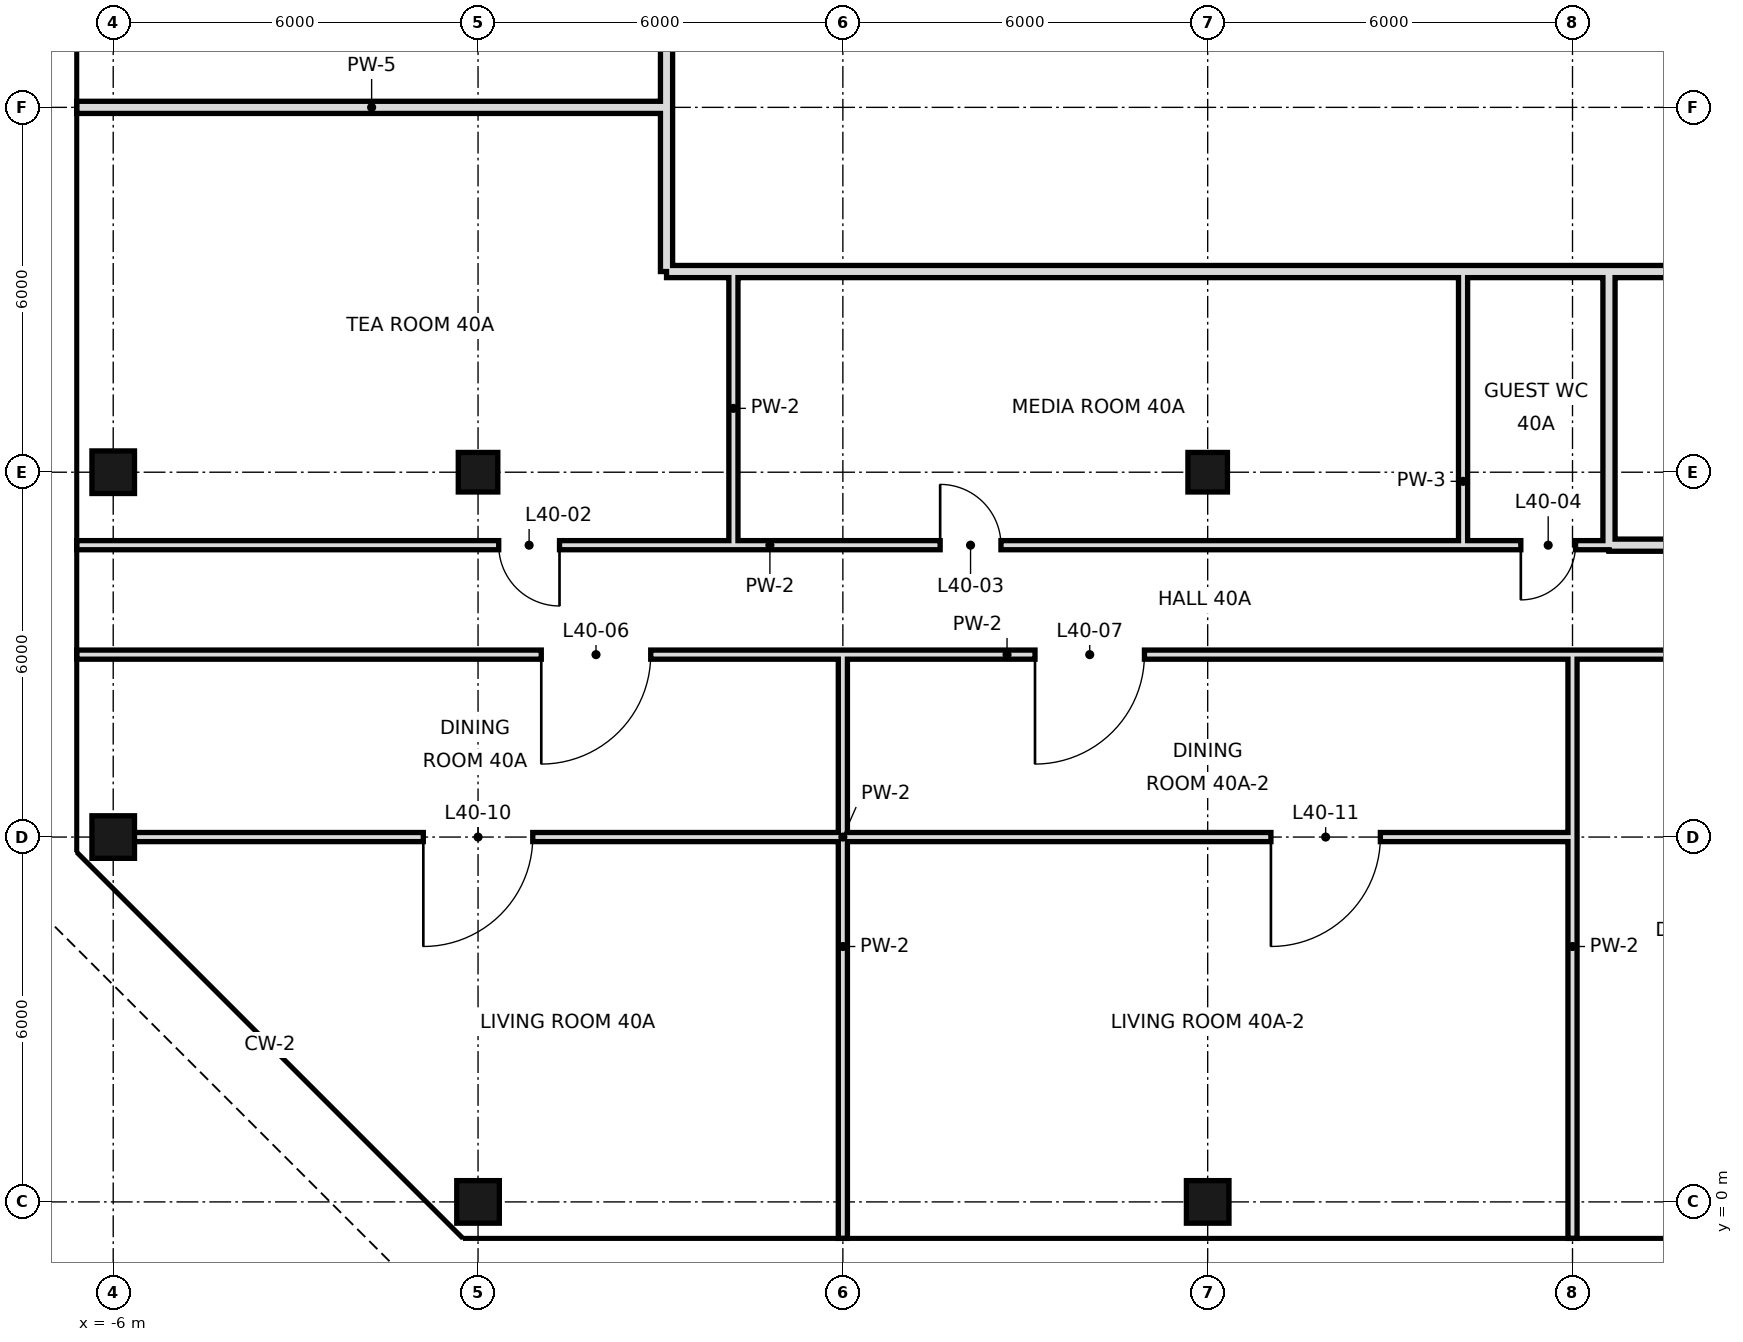
"""IFC4 building model, lengths in metres.
Left out: names, types, materials, properties, quantities, classifications, styles, units other than length and angle.
Written with IfcOpenShell. Run it as: python <this file> out.ifc"""

import sys

from ifc_helpers import new_model, si_unit, direction, frame, frame_2d, origin, origin_2d, place, context, subcontext, project, spatial, rectangle, hollow_rectangle, extrude, element, fill, save


model = new_model("IFC4")
c1 = context("Model", 3, precision=1e-05, world=origin(), true_north=direction((0.0, 1.0)))
c2 = subcontext(c1, "Body", "Model", "MODEL_VIEW")
j1 = project(units=[si_unit("LENGTHUNIT", "METRE"), si_unit("PLANEANGLEUNIT", "RADIAN")], contexts=[c1])
p1 = place(None, origin())
s1 = spatial("IfcSite", under=j1, at=p1, CompositionType="ELEMENT")
p2 = place(p1, origin())
s2 = spatial("IfcBuilding", under=s1, at=p2, CompositionType="ELEMENT")
p3 = place(p2, frame((0.0, 0.0, 174.4)))
s3 = spatial("IfcBuildingStorey", under=s2, at=p3, CompositionType="ELEMENT", Elevation=174.4)
for number, where, z_axis, x_axis in (
    (1, (-6.0, 6.0, 0.0), (0.0, 0.0, 1.0), (1.0, 0.0, 0.0)),
    (2, (-6.0, 12.0, 0.0), (0.0, 0.0, 1.0), (1.0, 0.0, 0.0)),
    (3, (0.0, 0.0, 0.0), (0.0, 0.0, 1.0), (1.0, 0.0, 0.0)),
):
    element("IfcColumn", number, at=place(p3, frame(where, z_axis=z_axis, x_axis=x_axis)), inside=s3, PredefinedType="COLUMN", context=c2, shape_type="SweptSolid", body=[
        extrude(hollow_rectangle(XDim=0.7, YDim=0.7, WallThickness=0.036, at=origin_2d()), origin(), (0.0, 0.0, 1.0), 3.6),
    ])
p4 = place(p3, frame((0.0, 12.0, 0.0), z_axis=(0.0, 0.0, 1.0), x_axis=(1.0, 0.0, 0.0)))
e4 = element("IfcColumn", 4, at=p4, inside=s3, PredefinedType="COLUMN", context=c2, shape_type="SweptSolid", body=[
    extrude(hollow_rectangle(XDim=0.65, YDim=0.65, WallThickness=0.032, at=origin_2d()), origin(), (0.0, 0.0, 1.0), 3.6),
])
p5 = place(p3, frame((12.0, 0.0, 0.0), z_axis=(0.0, 0.0, 1.0), x_axis=(1.0, 0.0, 0.0)))
e5 = element("IfcColumn", 5, at=p5, inside=s3, PredefinedType="COLUMN", context=c2, shape_type="SweptSolid", body=[
    extrude(hollow_rectangle(XDim=0.7, YDim=0.7, WallThickness=0.036, at=origin_2d()), origin(), (0.0, 0.0, 1.0), 3.6),
])
p6 = place(p3, frame((12.0, 12.0, 0.0), z_axis=(0.0, 0.0, 1.0), x_axis=(1.0, 0.0, 0.0)))
e6 = element("IfcColumn", 6, at=p6, inside=s3, PredefinedType="COLUMN", context=c2, shape_type="SweptSolid", body=[
    extrude(hollow_rectangle(XDim=0.65, YDim=0.65, WallThickness=0.032, at=origin_2d()), origin(), (0.0, 0.0, 1.0), 3.6),
])
p7 = place(p3, frame((16.2, 10.8, 0.0), z_axis=(0.0, 0.0, 1.0), x_axis=(0.0, 1.0, 0.0)))
e7 = element("IfcWall", 7, at=p7, inside=s3, PredefinedType="PARTITIONING", context=c2, shape_type="SweptSolid", body=[
    extrude(rectangle(XDim=4.5, YDim=0.15, at=frame_2d((2.25, 0.0))), origin(), (0.0, 0.0, 1.0), 3.42),
])
p8 = place(p3, frame((18.0, -0.6, 0.0), z_axis=(0.0, 0.0, 1.0), x_axis=(0.0, 1.0, 0.0)))
e8 = element("IfcWall", 8, at=p8, inside=s3, PredefinedType="PARTITIONING", context=c2, shape_type="SweptSolid", body=[
    extrude(rectangle(XDim=9.6, YDim=0.15, at=frame_2d((4.8, 0.0))), origin(), (0.0, 0.0, 1.0), 2.72),
])
p9 = place(p3, frame((18.6, 10.8, 0.0), z_axis=(0.0, 0.0, 1.0), x_axis=(0.0, 1.0, 0.0)))
e9 = element("IfcWall", 9, at=p9, inside=s3, PredefinedType="SOLIDWALL", context=c2, shape_type="SweptSolid", body=[
    extrude(rectangle(XDim=4.5, YDim=0.2, at=frame_2d((2.25, 0.0))), origin(), (0.0, 0.0, 1.0), 2.72),
])
p10 = place(p3, frame((3.1, 15.3, 0.0), z_axis=(0.0, 0.0, 1.0), x_axis=(0.0, 1.0, 0.0)))
e10 = element("IfcWall", 10, at=p10, inside=s3, PredefinedType="SOLIDWALL", context=c2, shape_type="SweptSolid", body=[
    extrude(rectangle(XDim=33.3, YDim=0.2, at=frame_2d((16.65, 0.0))), origin(), (0.0, 0.0, 1.0), 2.72),
])
p11 = place(p10, frame((17.1, 0.0, 0.0)))
e11 = element("IfcOpeningElement", 11, at=p11, cuts=e10, PredefinedType="OPENING", context=c2, shape_type="SweptSolid", body=[
    extrude(rectangle(XDim=1.2, YDim=2.4, at=frame_2d((0.6, 1.2))), frame((0.0, 0.11, 0.0), z_axis=(0.0, -1.0, 0.0), x_axis=(1.0, 0.0, 0.0)), (0.0, 0.0, 1.0), 0.22),
])
p12 = place(p3, frame((4.2, 10.8, 0.0), z_axis=(0.0, 0.0, 1.0), x_axis=(0.0, 1.0, 0.0)))
e12 = element("IfcWall", 12, at=p12, inside=s3, PredefinedType="PARTITIONING", context=c2, shape_type="SweptSolid", body=[
    extrude(rectangle(XDim=4.5, YDim=0.15, at=frame_2d((2.25, 0.0))), origin(), (0.0, 0.0, 1.0), 3.42),
])
p13 = place(p3, frame((6.0, -0.6, 0.0), z_axis=(0.0, 0.0, 1.0), x_axis=(0.0, 1.0, 0.0)))
e13 = element("IfcWall", 13, at=p13, inside=s3, PredefinedType="PARTITIONING", context=c2, shape_type="SweptSolid", body=[
    extrude(rectangle(XDim=9.6, YDim=0.15, at=frame_2d((4.8, 0.0))), origin(), (0.0, 0.0, 1.0), 2.72),
])
p14 = place(p3, frame((18.6, 10.8, 0.0), z_axis=(0.0, 0.0, 1.0), x_axis=(1.0, 0.0, 0.0)))
e14 = element("IfcWall", 14, at=p14, inside=s3, PredefinedType="SOLIDWALL", context=c2, shape_type="SweptSolid", body=[
    extrude(rectangle(XDim=5.4, YDim=0.2, at=frame_2d((2.7, 0.0))), origin(), (0.0, 0.0, 1.0), 2.72),
])
p15 = place(p14, frame((2.98, 0.0, 0.0)))
e15 = element("IfcOpeningElement", 15, at=p15, cuts=e14, PredefinedType="OPENING", context=c2, shape_type="SweptSolid", body=[
    extrude(rectangle(XDim=1.0, YDim=2.4, at=frame_2d((0.5, 1.2))), frame((0.0, 0.11, 0.0), z_axis=(0.0, -1.0, 0.0), x_axis=(1.0, 0.0, 0.0)), (0.0, 0.0, 1.0), 0.22),
])
p16 = place(p3, frame((-6.6, 10.8, 0.0), z_axis=(0.0, 0.0, 1.0), x_axis=(1.0, 0.0, 0.0)))
e16 = element("IfcWall", 16, at=p16, inside=s3, PredefinedType="PARTITIONING", context=c2, shape_type="SweptSolid", body=[
    extrude(rectangle(XDim=22.8, YDim=0.15, at=frame_2d((11.4, 0.0))), origin(), (0.0, 0.0, 1.0), 3.42),
])
p17 = place(p16, frame((6.94, 0.0, 0.0)))
e17 = element("IfcOpeningElement", 17, at=p17, cuts=e16, PredefinedType="OPENING", context=c2, shape_type="SweptSolid", body=[
    extrude(rectangle(XDim=1.0, YDim=2.4, at=frame_2d((0.5, 1.2))), frame((0.0, 0.085, 0.0), z_axis=(0.0, -1.0, 0.0), x_axis=(1.0, 0.0, 0.0)), (0.0, 0.0, 1.0), 0.17),
])
p18 = place(p16, frame((14.2, 0.0, 0.0)))
e18 = element("IfcOpeningElement", 18, at=p18, cuts=e16, PredefinedType="OPENING", context=c2, shape_type="SweptSolid", body=[
    extrude(rectangle(XDim=1.0, YDim=2.4, at=frame_2d((0.5, 1.2))), frame((0.0, 0.085, 0.0), z_axis=(0.0, -1.0, 0.0), x_axis=(1.0, 0.0, 0.0)), (0.0, 0.0, 1.0), 0.17),
])
p19 = place(p3, frame((16.2, 10.8, 0.0), z_axis=(0.0, 0.0, 1.0), x_axis=(1.0, 0.0, 0.0)))
e19 = element("IfcWall", 19, at=p19, inside=s3, PredefinedType="PARTITIONING", context=c2, shape_type="SweptSolid", body=[
    extrude(rectangle(XDim=2.4, YDim=0.15, at=frame_2d((1.2, 0.0))), origin(), (0.0, 0.0, 1.0), 3.42),
])
p20 = place(p19, frame((0.95, 0.0, 0.0)))
e20 = element("IfcOpeningElement", 20, at=p20, cuts=e19, PredefinedType="OPENING", context=c2, shape_type="SweptSolid", body=[
    extrude(rectangle(XDim=0.9, YDim=2.4, at=frame_2d((0.45, 1.2))), frame((0.0, 0.085, 0.0), z_axis=(0.0, -1.0, 0.0), x_axis=(1.0, 0.0, 0.0)), (0.0, 0.0, 1.0), 0.17),
])
p21 = place(p3, frame((3.1, 15.3, 0.0), z_axis=(0.0, 0.0, 1.0), x_axis=(1.0, 0.0, 0.0)))
e21 = element("IfcWall", 21, at=p21, inside=s3, PredefinedType="SOLIDWALL", context=c2, shape_type="SweptSolid", body=[
    extrude(rectangle(XDim=15.5, YDim=0.2, at=frame_2d((7.75, 0.0))), origin(), (0.0, 0.0, 1.0), 2.72),
])
p22 = place(p3, frame((18.6, 15.3, 0.0), z_axis=(0.0, 0.0, 1.0), x_axis=(1.0, 0.0, 0.0)))
e22 = element("IfcWall", 22, at=p22, inside=s3, PredefinedType="SOLIDWALL", context=c2, shape_type="SweptSolid", body=[
    extrude(rectangle(XDim=5.4, YDim=0.2, at=frame_2d((2.7, 0.0))), origin(), (0.0, 0.0, 1.0), 3.42),
])
p23 = place(p3, frame((-6.6, 18.0, 0.0), z_axis=(0.0, 0.0, 1.0), x_axis=(1.0, 0.0, 0.0)))
e23 = element("IfcWall", 23, at=p23, inside=s3, PredefinedType="SOLIDWALL", context=c2, shape_type="SweptSolid", body=[
    extrude(rectangle(XDim=9.7, YDim=0.2, at=frame_2d((4.85, 0.0))), origin(), (0.0, 0.0, 1.0), 2.72),
])
p24 = place(p3, frame((-6.0, 6.0, 0.0), z_axis=(0.0, 0.0, 1.0), x_axis=(1.0, 0.0, 0.0)))
e24 = element("IfcWall", 24, at=p24, inside=s3, PredefinedType="PARTITIONING", context=c2, shape_type="SweptSolid", body=[
    extrude(rectangle(XDim=24.0, YDim=0.15, at=frame_2d((12.0, 0.0))), origin(), (0.0, 0.0, 1.0), 2.97),
])
p25 = place(p24, frame((5.1, 0.0, 0.0)))
e25 = element("IfcOpeningElement", 25, at=p25, cuts=e24, PredefinedType="OPENING", context=c2, shape_type="SweptSolid", body=[
    extrude(rectangle(XDim=1.8, YDim=2.4, at=frame_2d((0.9, 1.2))), frame((0.0, 0.085, 0.0), z_axis=(0.0, -1.0, 0.0), x_axis=(1.0, 0.0, 0.0)), (0.0, 0.0, 1.0), 0.17),
])
p26 = place(p24, frame((19.04, 0.0, 0.0)))
e26 = element("IfcOpeningElement", 26, at=p26, cuts=e24, PredefinedType="OPENING", context=c2, shape_type="SweptSolid", body=[
    extrude(rectangle(XDim=1.8, YDim=2.4, at=frame_2d((0.9, 1.2))), frame((0.0, 0.085, 0.0), z_axis=(0.0, -1.0, 0.0), x_axis=(1.0, 0.0, 0.0)), (0.0, 0.0, 1.0), 0.17),
])
p27 = place(p3, frame((-6.6, 9.0, 0.0), z_axis=(0.0, 0.0, 1.0), x_axis=(1.0, 0.0, 0.0)))
e27 = element("IfcWall", 27, at=p27, inside=s3, PredefinedType="PARTITIONING", context=c2, shape_type="SweptSolid", body=[
    extrude(rectangle(XDim=30.6, YDim=0.15, at=frame_2d((15.3, 0.0))), origin(), (0.0, 0.0, 1.0), 3.42),
])
p28 = place(p27, frame((7.64, 0.0, 0.0)))
e28 = element("IfcOpeningElement", 28, at=p28, cuts=e27, PredefinedType="OPENING", context=c2, shape_type="SweptSolid", body=[
    extrude(rectangle(XDim=1.8, YDim=2.4, at=frame_2d((0.9, 1.2))), frame((0.0, 0.085, 0.0), z_axis=(0.0, -1.0, 0.0), x_axis=(1.0, 0.0, 0.0)), (0.0, 0.0, 1.0), 0.17),
])
p29 = place(p27, frame((15.76, 0.0, 0.0)))
e29 = element("IfcOpeningElement", 29, at=p29, cuts=e27, PredefinedType="OPENING", context=c2, shape_type="SweptSolid", body=[
    extrude(rectangle(XDim=1.8, YDim=2.4, at=frame_2d((0.9, 1.2))), frame((0.0, 0.085, 0.0), z_axis=(0.0, -1.0, 0.0), x_axis=(1.0, 0.0, 0.0)), (0.0, 0.0, 1.0), 0.17),
])
p30 = place(p27, frame((27.44, 0.0, 0.0)))
e30 = element("IfcOpeningElement", 30, at=p30, cuts=e27, PredefinedType="OPENING", context=c2, shape_type="SweptSolid", body=[
    extrude(rectangle(XDim=1.8, YDim=2.4, at=frame_2d((0.9, 1.2))), frame((0.0, 0.085, 0.0), z_axis=(0.0, -1.0, 0.0), x_axis=(1.0, 0.0, 0.0)), (0.0, 0.0, 1.0), 0.17),
])
p31 = place(p17, origin())
e31 = element("IfcDoor", 31, at=p31, inside=s3, OperationType="SINGLE_SWING_RIGHT", PredefinedType="DOOR", context=c2, shape_type="SweptSolid", body=[
    extrude(rectangle(XDim=1.0, YDim=2.4, at=frame_2d((0.5, 1.2))), frame((0.0, 0.025, 0.0), z_axis=(0.0, -1.0, 0.0), x_axis=(1.0, 0.0, 0.0)), (0.0, 0.0, 1.0), 0.05),
])
fill(e17, e31)
p32 = place(p18, origin())
e32 = element("IfcDoor", 32, at=p32, inside=s3, OperationType="SINGLE_SWING_LEFT", PredefinedType="DOOR", context=c2, shape_type="SweptSolid", body=[
    extrude(rectangle(XDim=1.0, YDim=2.4, at=frame_2d((0.5, 1.2))), frame((0.0, 0.025, 0.0), z_axis=(0.0, -1.0, 0.0), x_axis=(1.0, 0.0, 0.0)), (0.0, 0.0, 1.0), 0.05),
])
fill(e18, e32)
p33 = place(p20, frame((0.9, 0.0, 0.0), z_axis=(0.0, 0.0, 1.0), x_axis=(-1.0, 0.0, 0.0)))
e33 = element("IfcDoor", 33, at=p33, inside=s3, OperationType="SINGLE_SWING_RIGHT", PredefinedType="DOOR", context=c2, shape_type="SweptSolid", body=[
    extrude(rectangle(XDim=0.9, YDim=2.4, at=frame_2d((0.45, 1.2))), frame((0.0, 0.025, 0.0), z_axis=(0.0, -1.0, 0.0), x_axis=(1.0, 0.0, 0.0)), (0.0, 0.0, 1.0), 0.05),
])
fill(e20, e33)
p34 = place(p28, frame((1.8, 0.0, 0.0), z_axis=(0.0, 0.0, 1.0), x_axis=(-1.0, 0.0, 0.0)))
e34 = element("IfcDoor", 34, at=p34, inside=s3, OperationType="SINGLE_SWING_RIGHT", PredefinedType="DOOR", context=c2, shape_type="SweptSolid", body=[
    extrude(rectangle(XDim=1.8, YDim=2.4, at=frame_2d((0.9, 1.2))), frame((0.0, 0.025, 0.0), z_axis=(0.0, -1.0, 0.0), x_axis=(1.0, 0.0, 0.0)), (0.0, 0.0, 1.0), 0.05),
])
fill(e28, e34)
p35 = place(p29, frame((1.8, 0.0, 0.0), z_axis=(0.0, 0.0, 1.0), x_axis=(-1.0, 0.0, 0.0)))
e35 = element("IfcDoor", 35, at=p35, inside=s3, OperationType="SINGLE_SWING_RIGHT", PredefinedType="DOOR", context=c2, shape_type="SweptSolid", body=[
    extrude(rectangle(XDim=1.8, YDim=2.4, at=frame_2d((0.9, 1.2))), frame((0.0, 0.025, 0.0), z_axis=(0.0, -1.0, 0.0), x_axis=(1.0, 0.0, 0.0)), (0.0, 0.0, 1.0), 0.05),
])
fill(e29, e35)
p36 = place(p25, frame((1.8, 0.0, 0.0), z_axis=(0.0, 0.0, 1.0), x_axis=(-1.0, 0.0, 0.0)))
e36 = element("IfcDoor", 36, at=p36, inside=s3, OperationType="SINGLE_SWING_RIGHT", PredefinedType="DOOR", context=c2, shape_type="SweptSolid", body=[
    extrude(rectangle(XDim=1.8, YDim=2.4, at=frame_2d((0.9, 1.2))), frame((0.0, 0.025, 0.0), z_axis=(0.0, -1.0, 0.0), x_axis=(1.0, 0.0, 0.0)), (0.0, 0.0, 1.0), 0.05),
])
fill(e25, e36)
p37 = place(p26, frame((1.8, 0.0, 0.0), z_axis=(0.0, 0.0, 1.0), x_axis=(-1.0, 0.0, 0.0)))
e37 = element("IfcDoor", 37, at=p37, inside=s3, OperationType="SINGLE_SWING_RIGHT", PredefinedType="DOOR", context=c2, shape_type="SweptSolid", body=[
    extrude(rectangle(XDim=1.8, YDim=2.4, at=frame_2d((0.9, 1.2))), frame((0.0, 0.025, 0.0), z_axis=(0.0, -1.0, 0.0), x_axis=(1.0, 0.0, 0.0)), (0.0, 0.0, 1.0), 0.05),
])
fill(e26, e37)
save(model, sys.argv[1])
